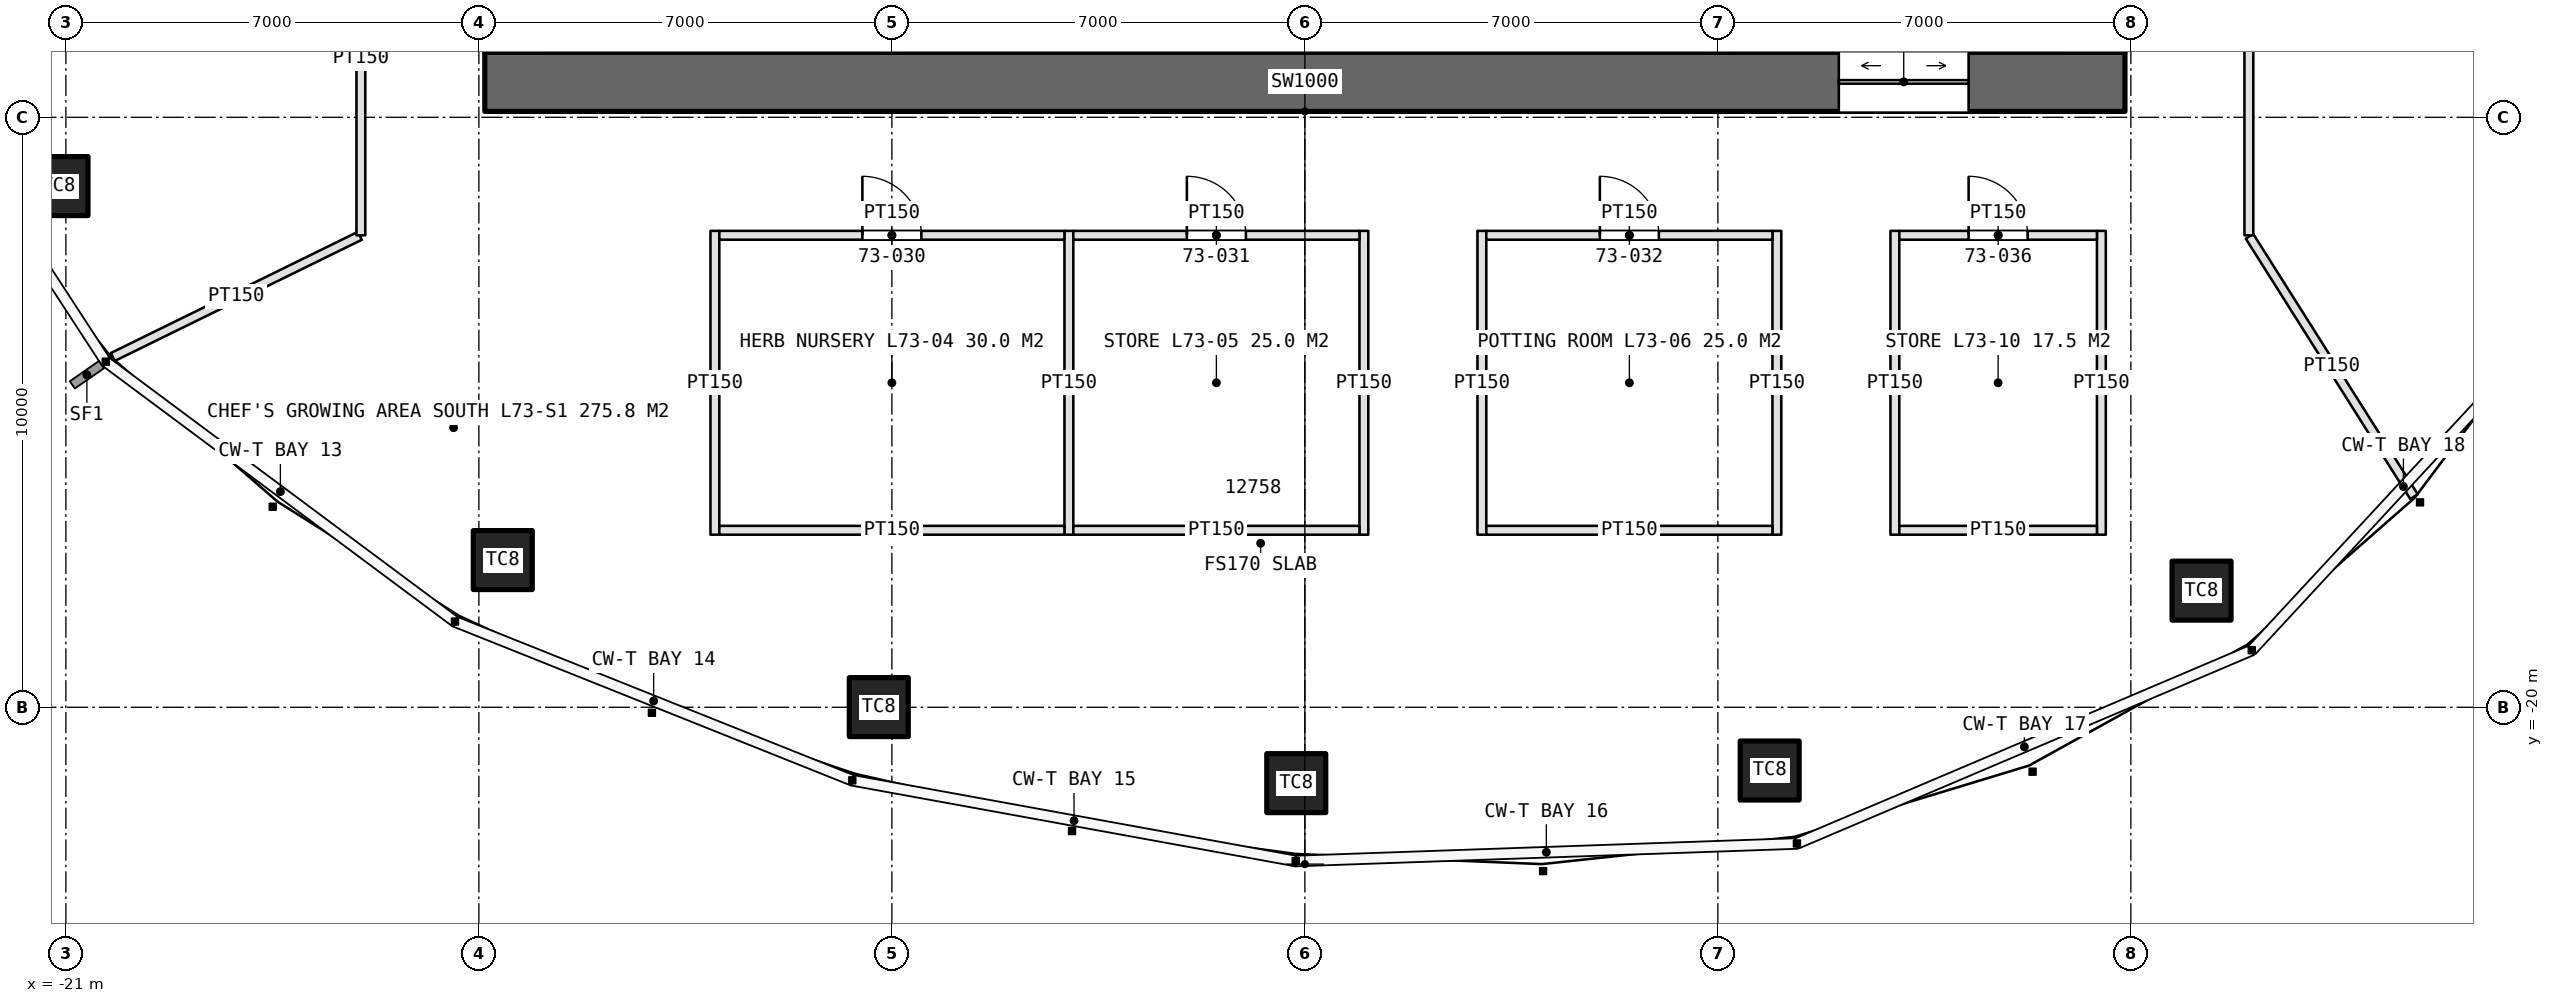
"""IFC4 building model, lengths in metres.
Left out: names, types, materials, properties, quantities, classifications, styles, units other than length and angle.
Written with IfcOpenShell. Run it as: python <this file> out.ifc"""

import sys

from ifc_helpers import new_model, si_unit, direction, frame, frame_2d, origin, origin_2d, place, context, subcontext, project, spatial, rectangle, extrude, element, fill, save


model = new_model("IFC4")
c1 = context("Model", 3, precision=1e-05, world=origin(), true_north=direction((0.0, 1.0)))
c2 = subcontext(c1, "Body", "Model", "MODEL_VIEW")
j1 = project(units=[si_unit("LENGTHUNIT", "METRE"), si_unit("PLANEANGLEUNIT", "RADIAN")], contexts=[c1])
p1 = place(None, origin())
s1 = spatial("IfcSite", under=j1, at=p1, CompositionType="ELEMENT")
p2 = place(p1, origin())
s2 = spatial("IfcBuilding", under=s1, at=p2, CompositionType="ELEMENT")
p3 = place(p2, frame((0.0, 0.0, 325.8)))
s3 = spatial("IfcBuildingStorey", under=s2, at=p3, CompositionType="ELEMENT", Elevation=325.8)
p4 = place(p3, frame((-13.9, -9.4, 0.0), z_axis=(0.0, 0.0, 1.0), x_axis=(1.0, 0.0, 0.0)))
e1 = element("IfcWall", 1, at=p4, inside=s3, PredefinedType="SHEAR", context=c2, shape_type="SweptSolid", body=[
    extrude(rectangle(XDim=27.8, YDim=1.0, at=frame_2d((13.9, 0.0))), origin(), (0.0, 0.0, 1.0), 4.2),
])
p5 = place(p4, frame((22.95, 0.0, 0.0)))
e2 = element("IfcOpeningElement", 2, at=p5, cuts=e1, PredefinedType="OPENING", context=c2, shape_type="SweptSolid", body=[
    extrude(rectangle(XDim=2.2, YDim=2.7, at=frame_2d((1.1, 1.35))), frame((0.0, 0.51, 0.0), z_axis=(0.0, -1.0, 0.0), x_axis=(1.0, 0.0, 0.0)), (0.0, 0.0, 1.0), 1.02),
])
for number, where, z_axis, x_axis in (
    (3, (-21.125, -11.166, 0.0), (0.0, 0.0, 1.0), (1.0, 0.0, 0.0)),
    (4, (-13.595, -17.505, 0.0), (0.0, 0.0, 1.0), (1.0, 0.0, 0.0)),
    (5, (-7.222, -19.997, 0.0), (0.0, 0.0, 1.0), (1.0, 0.0, 0.0)),
    (6, (-0.146, -21.286, 0.0), (0.0, 0.0, 1.0), (1.0, 0.0, 0.0)),
    (7, (7.878, -21.072, 0.0), (0.0, 0.0, 1.0), (1.0, 0.0, 0.0)),
    (8, (15.198, -18.023, 0.0), (0.0, 0.0, 1.0), (1.0, 0.0, 0.0)),
):
    element("IfcColumn", number, at=place(p3, frame(where, z_axis=z_axis, x_axis=x_axis)), inside=s3, PredefinedType="COLUMN", context=c2, shape_type="SweptSolid", body=[
        extrude(rectangle(XDim=1.0, YDim=1.0, at=origin_2d()), origin(), (0.0, 0.0, 1.0), 4.2),
    ])
for number, where, z_axis, x_axis in (
    (9, (-4.2, -4.7, 0.0), (0.0, 0.0, 1.0), (0.0, -1.0, 0.0)),
    (10, (-1.4, -4.7, 0.0), (0.0, 0.0, 1.0), (0.0, -1.0, 0.0)),
    (11, (1.4, -4.7, 0.0), (0.0, 0.0, 1.0), (0.0, -1.0, 0.0)),
    (12, (4.2, -4.7, 0.0), (0.0, 0.0, 1.0), (0.0, -1.0, 0.0)),
):
    element("IfcWall", number, at=place(p3, frame(where, z_axis=z_axis, x_axis=x_axis)), inside=s3, PredefinedType="PARTITIONING", context=c2, shape_type="SweptSolid", body=[
        extrude(rectangle(XDim=4.2, YDim=0.2, at=frame_2d((2.1, 0.0))), origin(), (0.0, 0.0, 1.0), 4.2),
    ])
for number, where, z_axis, x_axis in (
    (13, (-10.0, -11.925, 0.0), (0.0, 0.0, 1.0), (0.0, -1.0, 0.0)),
    (14, (-4.0, -11.925, 0.0), (0.0, 0.0, 1.0), (0.0, -1.0, 0.0)),
    (15, (1.0, -11.925, 0.0), (0.0, 0.0, 1.0), (0.0, -1.0, 0.0)),
):
    element("IfcWall", number, at=place(p3, frame(where, z_axis=z_axis, x_axis=x_axis)), inside=s3, PredefinedType="PARTITIONING", context=c2, shape_type="SweptSolid", body=[
        extrude(rectangle(XDim=5.15, YDim=0.15, at=frame_2d((2.575, 0.0))), origin(), (0.0, 0.0, 1.0), 3.0),
    ])
p6 = place(p3, frame((-9.925, -12.0, 0.0), z_axis=(0.0, 0.0, 1.0), x_axis=(1.0, 0.0, 0.0)))
e16 = element("IfcWall", 16, at=p6, inside=s3, PredefinedType="PARTITIONING", context=c2, shape_type="SweptSolid", body=[
    extrude(rectangle(XDim=5.85, YDim=0.15, at=frame_2d((2.925, 0.0))), origin(), (0.0, 0.0, 1.0), 3.0),
])
p7 = place(p6, frame((2.425, 0.0, 0.0)))
e17 = element("IfcOpeningElement", 17, at=p7, cuts=e16, PredefinedType="OPENING", context=c2, shape_type="SweptSolid", body=[
    extrude(rectangle(XDim=1.0, YDim=2.2, at=frame_2d((0.5, 1.1))), frame((0.0, 0.085, 0.0), z_axis=(0.0, -1.0, 0.0), x_axis=(1.0, 0.0, 0.0)), (0.0, 0.0, 1.0), 0.17),
])
p8 = place(p3, frame((-9.925, -17.0, 0.0), z_axis=(0.0, 0.0, 1.0), x_axis=(1.0, 0.0, 0.0)))
e18 = element("IfcWall", 18, at=p8, inside=s3, PredefinedType="PARTITIONING", context=c2, shape_type="SweptSolid", body=[
    extrude(rectangle(XDim=5.85, YDim=0.15, at=frame_2d((2.925, 0.0))), origin(), (0.0, 0.0, 1.0), 3.0),
])
p9 = place(p3, frame((-3.925, -12.0, 0.0), z_axis=(0.0, 0.0, 1.0), x_axis=(1.0, 0.0, 0.0)))
e19 = element("IfcWall", 19, at=p9, inside=s3, PredefinedType="PARTITIONING", context=c2, shape_type="SweptSolid", body=[
    extrude(rectangle(XDim=4.85, YDim=0.15, at=frame_2d((2.425, 0.0))), origin(), (0.0, 0.0, 1.0), 3.0),
])
p10 = place(p9, frame((1.925, 0.0, 0.0)))
e20 = element("IfcOpeningElement", 20, at=p10, cuts=e19, PredefinedType="OPENING", context=c2, shape_type="SweptSolid", body=[
    extrude(rectangle(XDim=1.0, YDim=2.2, at=frame_2d((0.5, 1.1))), frame((0.0, 0.085, 0.0), z_axis=(0.0, -1.0, 0.0), x_axis=(1.0, 0.0, 0.0)), (0.0, 0.0, 1.0), 0.17),
])
p11 = place(p3, frame((-3.925, -17.0, 0.0), z_axis=(0.0, 0.0, 1.0), x_axis=(1.0, 0.0, 0.0)))
e21 = element("IfcWall", 21, at=p11, inside=s3, PredefinedType="PARTITIONING", context=c2, shape_type="SweptSolid", body=[
    extrude(rectangle(XDim=4.85, YDim=0.15, at=frame_2d((2.425, 0.0))), origin(), (0.0, 0.0, 1.0), 3.0),
])
for number, where, z_axis, x_axis in (
    (22, (3.0, -11.925, 0.0), (0.0, 0.0, 1.0), (0.0, -1.0, 0.0)),
    (23, (8.0, -11.925, 0.0), (0.0, 0.0, 1.0), (0.0, -1.0, 0.0)),
):
    element("IfcWall", number, at=place(p3, frame(where, z_axis=z_axis, x_axis=x_axis)), inside=s3, PredefinedType="PARTITIONING", context=c2, shape_type="SweptSolid", body=[
        extrude(rectangle(XDim=5.15, YDim=0.15, at=frame_2d((2.575, 0.0))), origin(), (0.0, 0.0, 1.0), 3.0),
    ])
p12 = place(p3, frame((3.075, -12.0, 0.0), z_axis=(0.0, 0.0, 1.0), x_axis=(1.0, 0.0, 0.0)))
e24 = element("IfcWall", 24, at=p12, inside=s3, PredefinedType="PARTITIONING", context=c2, shape_type="SweptSolid", body=[
    extrude(rectangle(XDim=4.85, YDim=0.15, at=frame_2d((2.425, 0.0))), origin(), (0.0, 0.0, 1.0), 3.0),
])
p13 = place(p12, frame((1.925, 0.0, 0.0)))
e25 = element("IfcOpeningElement", 25, at=p13, cuts=e24, PredefinedType="OPENING", context=c2, shape_type="SweptSolid", body=[
    extrude(rectangle(XDim=1.0, YDim=2.2, at=frame_2d((0.5, 1.1))), frame((0.0, 0.085, 0.0), z_axis=(0.0, -1.0, 0.0), x_axis=(1.0, 0.0, 0.0)), (0.0, 0.0, 1.0), 0.17),
])
p14 = place(p3, frame((3.075, -17.0, 0.0), z_axis=(0.0, 0.0, 1.0), x_axis=(1.0, 0.0, 0.0)))
e26 = element("IfcWall", 26, at=p14, inside=s3, PredefinedType="PARTITIONING", context=c2, shape_type="SweptSolid", body=[
    extrude(rectangle(XDim=4.85, YDim=0.15, at=frame_2d((2.425, 0.0))), origin(), (0.0, 0.0, 1.0), 3.0),
])
for number, where, z_axis, x_axis in (
    (27, (10.0, -11.925, 0.0), (0.0, 0.0, 1.0), (0.0, -1.0, 0.0)),
    (28, (13.5, -11.925, 0.0), (0.0, 0.0, 1.0), (0.0, -1.0, 0.0)),
):
    element("IfcWall", number, at=place(p3, frame(where, z_axis=z_axis, x_axis=x_axis)), inside=s3, PredefinedType="PARTITIONING", context=c2, shape_type="SweptSolid", body=[
        extrude(rectangle(XDim=5.15, YDim=0.15, at=frame_2d((2.575, 0.0))), origin(), (0.0, 0.0, 1.0), 3.0),
    ])
p15 = place(p3, frame((10.075, -12.0, 0.0), z_axis=(0.0, 0.0, 1.0), x_axis=(1.0, 0.0, 0.0)))
e29 = element("IfcWall", 29, at=p15, inside=s3, PredefinedType="PARTITIONING", context=c2, shape_type="SweptSolid", body=[
    extrude(rectangle(XDim=3.35, YDim=0.15, at=frame_2d((1.675, 0.0))), origin(), (0.0, 0.0, 1.0), 3.0),
])
p16 = place(p15, frame((1.175, 0.0, 0.0)))
e30 = element("IfcOpeningElement", 30, at=p16, cuts=e29, PredefinedType="OPENING", context=c2, shape_type="SweptSolid", body=[
    extrude(rectangle(XDim=1.0, YDim=2.2, at=frame_2d((0.5, 1.1))), frame((0.0, 0.085, 0.0), z_axis=(0.0, -1.0, 0.0), x_axis=(1.0, 0.0, 0.0)), (0.0, 0.0, 1.0), 0.17),
])
p17 = place(p3, frame((10.075, -17.0, 0.0), z_axis=(0.0, 0.0, 1.0), x_axis=(1.0, 0.0, 0.0)))
e31 = element("IfcWall", 31, at=p17, inside=s3, PredefinedType="PARTITIONING", context=c2, shape_type="SweptSolid", body=[
    extrude(rectangle(XDim=3.35, YDim=0.15, at=frame_2d((1.675, 0.0))), origin(), (0.0, 0.0, 1.0), 3.0),
])
p18 = place(p3, frame((-16.018, -12.009, 0.0), z_axis=(0.0, 0.0, 1.0), x_axis=(-0.897771840996, -0.440460805879, 0.0)))
e32 = element("IfcWall", 32, at=p18, inside=s3, PredefinedType="PARTITIONING", context=c2, shape_type="SweptSolid", body=[
    extrude(rectangle(XDim=4.666, YDim=0.15, at=frame_2d((2.333, 0.0))), origin(), (0.0, 0.0, 1.0), 3.0),
])
p19 = place(p3, frame((16.011, -12.017, 0.0), z_axis=(0.0, 0.0, 1.0), x_axis=(0.53415837449, -0.845384427916, 0.0)))
e33 = element("IfcWall", 33, at=p19, inside=s3, PredefinedType="PARTITIONING", context=c2, shape_type="SweptSolid", body=[
    extrude(rectangle(XDim=5.22, YDim=0.15, at=frame_2d((2.61, 0.0))), origin(), (0.0, 0.0, 1.0), 3.0),
])
p20 = place(p3, frame((16.0, -12.0, 0.0), z_axis=(0.0, 0.0, 1.0), x_axis=(0.0, 1.0, 0.0)))
e34 = element("IfcWall", 34, at=p20, inside=s3, PredefinedType="PARTITIONING", context=c2, shape_type="SweptSolid", body=[
    extrude(rectangle(XDim=7.0, YDim=0.15, at=frame_2d((3.5, 0.0))), origin(), (0.0, 0.0, 1.0), 3.0),
])
p21 = place(p20, frame((4.9, 0.0, 0.0)))
e35 = element("IfcOpeningElement", 35, at=p21, cuts=e34, PredefinedType="OPENING", context=c2, shape_type="SweptSolid", body=[
    extrude(rectangle(XDim=1.6, YDim=2.4, at=frame_2d((0.8, 1.2))), frame((0.0, 0.085, 0.0), z_axis=(0.0, -1.0, 0.0), x_axis=(1.0, 0.0, 0.0)), (0.0, 0.0, 1.0), 0.17),
])
p22 = place(p3, frame((-16.0, -6.0, 0.0), z_axis=(0.0, 0.0, 1.0), x_axis=(0.0, -1.0, 0.0)))
e36 = element("IfcWall", 36, at=p22, inside=s3, PredefinedType="PARTITIONING", context=c2, shape_type="SweptSolid", body=[
    extrude(rectangle(XDim=6.0, YDim=0.15, at=frame_2d((3.0, 0.0))), origin(), (0.0, 0.0, 1.0), 3.0),
])
p23 = place(p22, frame((0.4, 0.0, 0.0)))
e37 = element("IfcOpeningElement", 37, at=p23, cuts=e36, PredefinedType="OPENING", context=c2, shape_type="SweptSolid", body=[
    extrude(rectangle(XDim=1.6, YDim=2.4, at=frame_2d((0.8, 1.2))), frame((0.0, 0.085, 0.0), z_axis=(0.0, -1.0, 0.0), x_axis=(1.0, 0.0, 0.0)), (0.0, 0.0, 1.0), 0.17),
])
p24 = place(p5, origin())
e38 = element("IfcDoor", 38, at=p24, inside=s3, OperationType="DOUBLE_DOOR_SLIDING", PredefinedType="DOOR", context=c2, shape_type="SweptSolid", body=[
    extrude(rectangle(XDim=2.2, YDim=2.7, at=frame_2d((1.1, 1.35))), frame((0.0, 0.025, 0.0), z_axis=(0.0, -1.0, 0.0), x_axis=(1.0, 0.0, 0.0)), (0.0, 0.0, 1.0), 0.05),
])
fill(e2, e38)
p25 = place(p7, origin())
e39 = element("IfcDoor", 39, at=p25, inside=s3, OperationType="SINGLE_SWING_LEFT", PredefinedType="DOOR", context=c2, shape_type="SweptSolid", body=[
    extrude(rectangle(XDim=1.0, YDim=2.2, at=frame_2d((0.5, 1.1))), frame((0.0, 0.025, 0.0), z_axis=(0.0, -1.0, 0.0), x_axis=(1.0, 0.0, 0.0)), (0.0, 0.0, 1.0), 0.05),
])
fill(e17, e39)
p26 = place(p10, origin())
e40 = element("IfcDoor", 40, at=p26, inside=s3, OperationType="SINGLE_SWING_LEFT", PredefinedType="DOOR", context=c2, shape_type="SweptSolid", body=[
    extrude(rectangle(XDim=1.0, YDim=2.2, at=frame_2d((0.5, 1.1))), frame((0.0, 0.025, 0.0), z_axis=(0.0, -1.0, 0.0), x_axis=(1.0, 0.0, 0.0)), (0.0, 0.0, 1.0), 0.05),
])
fill(e20, e40)
p27 = place(p13, origin())
e41 = element("IfcDoor", 41, at=p27, inside=s3, OperationType="SINGLE_SWING_LEFT", PredefinedType="DOOR", context=c2, shape_type="SweptSolid", body=[
    extrude(rectangle(XDim=1.0, YDim=2.2, at=frame_2d((0.5, 1.1))), frame((0.0, 0.025, 0.0), z_axis=(0.0, -1.0, 0.0), x_axis=(1.0, 0.0, 0.0)), (0.0, 0.0, 1.0), 0.05),
])
fill(e25, e41)
p28 = place(p16, origin())
e42 = element("IfcDoor", 42, at=p28, inside=s3, OperationType="SINGLE_SWING_LEFT", PredefinedType="DOOR", context=c2, shape_type="SweptSolid", body=[
    extrude(rectangle(XDim=1.0, YDim=2.2, at=frame_2d((0.5, 1.1))), frame((0.0, 0.025, 0.0), z_axis=(0.0, -1.0, 0.0), x_axis=(1.0, 0.0, 0.0)), (0.0, 0.0, 1.0), 0.05),
])
fill(e30, e42)
save(model, sys.argv[1])
